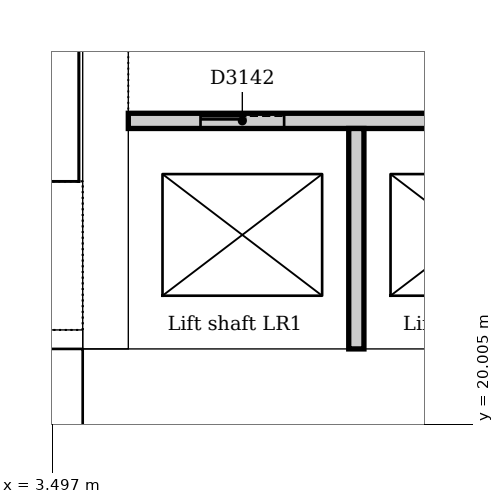
"""IFC4 building model, lengths in metres.
Left out: names, types, materials, properties, quantities, classifications, styles, units other than length and angle.
Written with IfcOpenShell. Run it as: python <this file> out.ifc"""

import sys

from ifc_helpers import new_model, si_unit, direction, frame, frame_2d, origin, place, context, subcontext, project, spatial, rectangle, extrude, element, fill, save


model = new_model("IFC4")
c1 = context("Model", 3, precision=1e-05, world=origin(), true_north=direction((0.0, 1.0)))
c2 = subcontext(c1, "Body", "Model", "MODEL_VIEW")
j1 = project(units=[si_unit("LENGTHUNIT", "METRE"), si_unit("PLANEANGLEUNIT", "RADIAN")], contexts=[c1])
p1 = place(None, origin())
s1 = spatial("IfcSite", under=j1, at=p1, CompositionType="ELEMENT")
p2 = place(p1, origin())
s2 = spatial("IfcBuilding", under=s1, at=p2, CompositionType="ELEMENT")
p3 = place(p2, frame((0.0, 0.0, 16.0)))
s3 = spatial("IfcBuildingStorey", under=s2, at=p3, CompositionType="ELEMENT", Elevation=16.0)
p4 = place(p3, frame((3.9, 20.4, 0.0), z_axis=(0.0, 0.0, 1.0), x_axis=(1.0, 0.0, 0.0)))
e1 = element("IfcWall", 1, at=p4, inside=s3, PredefinedType="SOLIDWALL", context=c2, shape_type="SweptSolid", body=[
    extrude(rectangle(XDim=19.8, YDim=1.2, at=frame_2d((9.9, 0.0))), origin(), (0.0, 0.0, 1.0), 5.0),
])
p5 = place(p3, frame((4.2, 31.5, 0.0), z_axis=(0.0, 0.0, 1.0), x_axis=(0.0, -1.0, 0.0)))
e2 = element("IfcWall", 2, at=p5, inside=s3, PredefinedType="SOLIDWALL", context=c2, shape_type="SweptSolid", body=[
    extrude(rectangle(XDim=10.5, YDim=0.6, at=frame_2d((5.25, 0.0))), origin(), (0.0, 0.0, 1.0), 5.0),
])
p6 = place(p5, frame((4.25, 0.0, 0.0)))
e3 = element("IfcOpeningElement", 3, at=p6, cuts=e2, PredefinedType="OPENING", context=c2, shape_type="SweptSolid", body=[
    extrude(rectangle(XDim=1.0, YDim=2.1, at=frame_2d((0.5, 1.05))), frame((0.0, 0.31, 0.0), z_axis=(0.0, -1.0, 0.0), x_axis=(1.0, 0.0, 0.0)), (0.0, 0.0, 1.0), 0.62),
])
p7 = place(p3, frame((0.36, 21.125, 0.0), z_axis=(0.0, 0.0, 1.0), x_axis=(1.0, 0.0, 0.0)))
e4 = element("IfcWall", 4, at=p7, inside=s3, PredefinedType="SOLIDWALL", context=c2, shape_type="SweptSolid", body=[
    extrude(rectangle(XDim=3.54, YDim=0.25, at=frame_2d((1.77, 0.0))), origin(), (0.0, 0.0, 1.0), 5.0),
])
p8 = place(p3, frame((4.5, 24.0, 0.0), z_axis=(0.0, 0.0, 1.0), x_axis=(1.0, 0.0, 0.0)))
e5 = element("IfcWall", 5, at=p8, inside=s3, PredefinedType="PARTITIONING", context=c2, shape_type="SweptSolid", body=[
    extrude(rectangle(XDim=18.0, YDim=0.2, at=frame_2d((9.0, 0.0))), origin(), (0.0, 0.0, 1.0), 4.7),
])
p9 = place(p8, frame((0.95, 0.0, 0.0)))
e6 = element("IfcOpeningElement", 6, at=p9, cuts=e5, PredefinedType="OPENING", context=c2, shape_type="SweptSolid", body=[
    extrude(rectangle(XDim=1.1, YDim=2.1, at=frame_2d((0.55, 1.05))), frame((0.0, 0.11, 0.0), z_axis=(0.0, -1.0, 0.0), x_axis=(1.0, 0.0, 0.0)), (0.0, 0.0, 1.0), 0.22),
])
p10 = place(p8, frame((3.95, 0.0, 0.0)))
e7 = element("IfcOpeningElement", 7, at=p10, cuts=e5, PredefinedType="OPENING", context=c2, shape_type="SweptSolid", body=[
    extrude(rectangle(XDim=1.1, YDim=2.1, at=frame_2d((0.55, 1.05))), frame((0.0, 0.11, 0.0), z_axis=(0.0, -1.0, 0.0), x_axis=(1.0, 0.0, 0.0)), (0.0, 0.0, 1.0), 0.22),
])
p11 = place(p8, frame((6.95, 0.0, 0.0)))
e8 = element("IfcOpeningElement", 8, at=p11, cuts=e5, PredefinedType="OPENING", context=c2, shape_type="SweptSolid", body=[
    extrude(rectangle(XDim=1.1, YDim=2.1, at=frame_2d((0.55, 1.05))), frame((0.0, 0.11, 0.0), z_axis=(0.0, -1.0, 0.0), x_axis=(1.0, 0.0, 0.0)), (0.0, 0.0, 1.0), 0.22),
])
p12 = place(p8, frame((9.95, 0.0, 0.0)))
e9 = element("IfcOpeningElement", 9, at=p12, cuts=e5, PredefinedType="OPENING", context=c2, shape_type="SweptSolid", body=[
    extrude(rectangle(XDim=1.1, YDim=2.1, at=frame_2d((0.55, 1.05))), frame((0.0, 0.11, 0.0), z_axis=(0.0, -1.0, 0.0), x_axis=(1.0, 0.0, 0.0)), (0.0, 0.0, 1.0), 0.22),
])
p13 = place(p8, frame((12.95, 0.0, 0.0)))
e10 = element("IfcOpeningElement", 10, at=p13, cuts=e5, PredefinedType="OPENING", context=c2, shape_type="SweptSolid", body=[
    extrude(rectangle(XDim=1.1, YDim=2.1, at=frame_2d((0.55, 1.05))), frame((0.0, 0.11, 0.0), z_axis=(0.0, -1.0, 0.0), x_axis=(1.0, 0.0, 0.0)), (0.0, 0.0, 1.0), 0.22),
])
p14 = place(p8, frame((15.95, 0.0, 0.0)))
e11 = element("IfcOpeningElement", 11, at=p14, cuts=e5, PredefinedType="OPENING", context=c2, shape_type="SweptSolid", body=[
    extrude(rectangle(XDim=1.1, YDim=2.1, at=frame_2d((0.55, 1.05))), frame((0.0, 0.11, 0.0), z_axis=(0.0, -1.0, 0.0), x_axis=(1.0, 0.0, 0.0)), (0.0, 0.0, 1.0), 0.22),
])
p15 = place(p3, frame((7.5, 21.0, 0.0), z_axis=(0.0, 0.0, 1.0), x_axis=(0.0, 1.0, 0.0)))
e12 = element("IfcWall", 12, at=p15, inside=s3, PredefinedType="PARTITIONING", context=c2, shape_type="SweptSolid", body=[
    extrude(rectangle(XDim=2.9, YDim=0.2, at=frame_2d((1.45, 0.0))), origin(), (0.0, 0.0, 1.0), 4.7),
])
p16 = place(p9, origin())
e13 = element("IfcDoor", 13, at=p16, inside=s3, OperationType="SLIDING_TO_LEFT", PredefinedType="DOOR", context=c2, shape_type="SweptSolid", body=[
    extrude(rectangle(XDim=1.1, YDim=2.1, at=frame_2d((0.55, 1.05))), frame((0.0, 0.025, 0.0), z_axis=(0.0, -1.0, 0.0), x_axis=(1.0, 0.0, 0.0)), (0.0, 0.0, 1.0), 0.05),
])
fill(e6, e13)
save(model, sys.argv[1])
